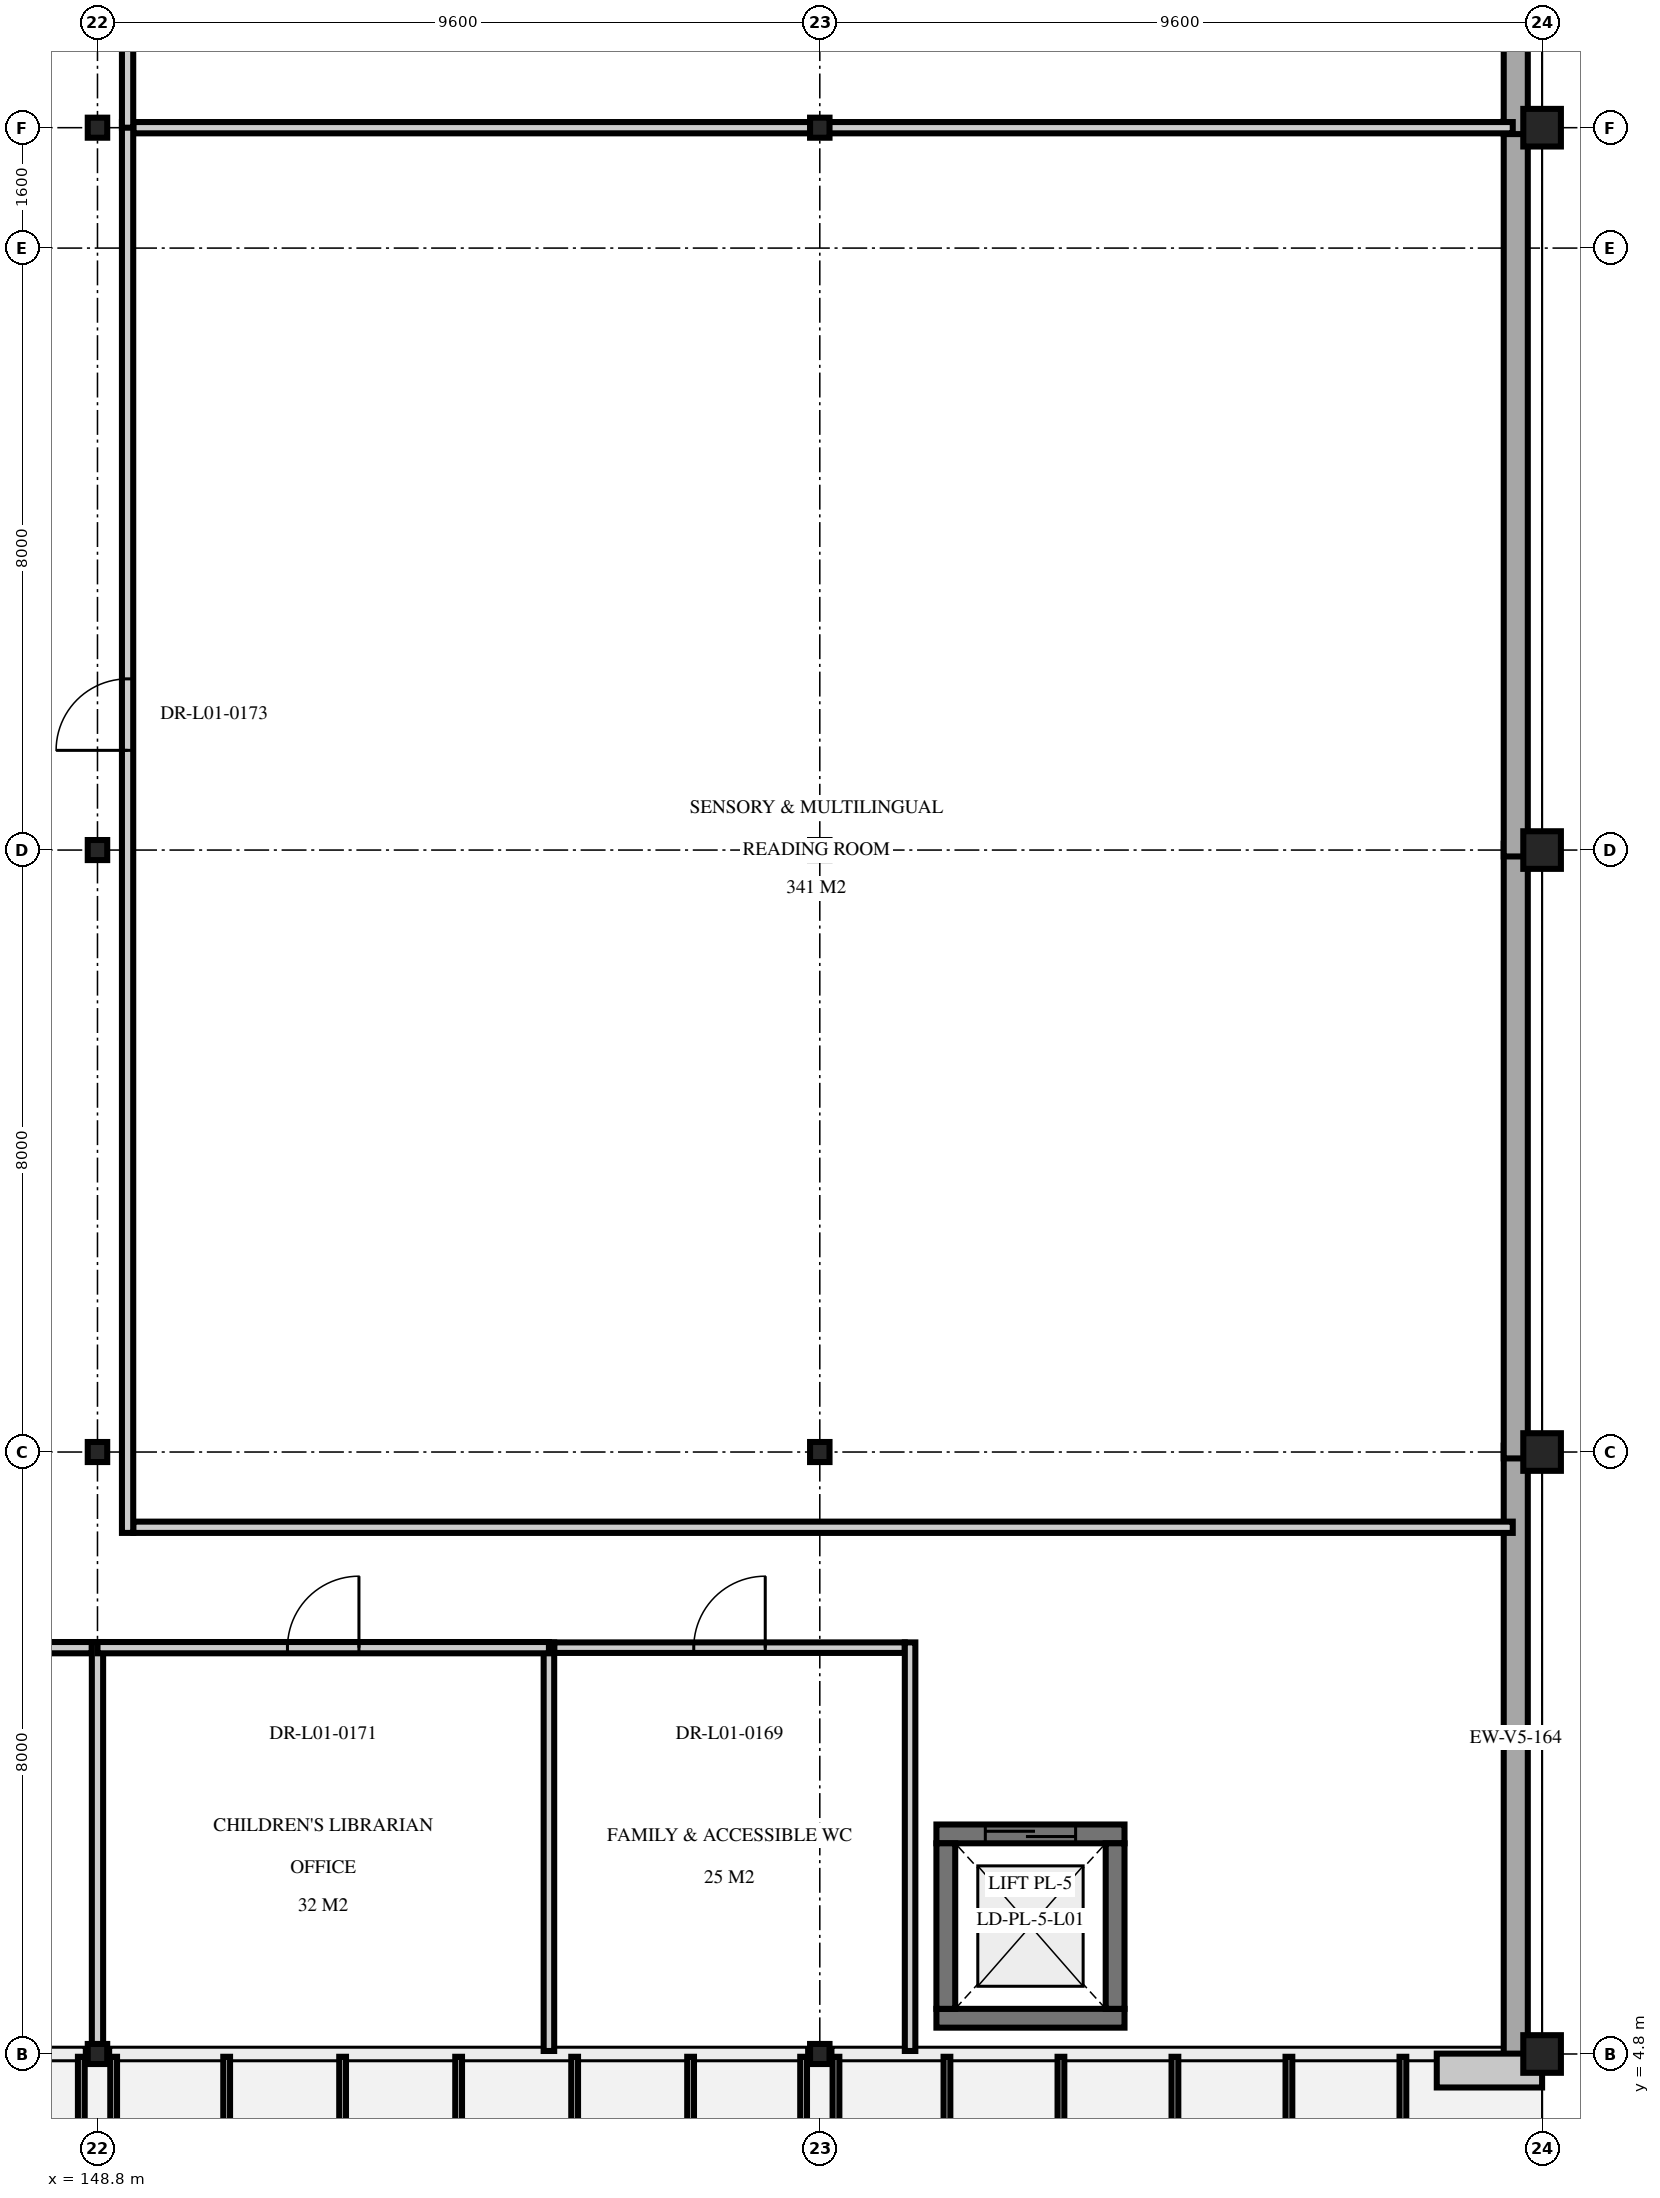
"""IFC4 building model, lengths in metres.
Left out: names, types, materials, properties, quantities, classifications, styles, units other than length and angle.
Written with IfcOpenShell. Run it as: python <this file> out.ifc"""

import sys

from ifc_helpers import new_model, si_unit, direction, frame, frame_2d, origin, origin_2d, place, context, subcontext, project, spatial, rectangle, i_section, extrude, element, fill, save


model = new_model("IFC4")
c1 = context("Model", 3, precision=1e-05, world=origin(), true_north=direction((0.0, 1.0)))
c2 = subcontext(c1, "Body", "Model", "MODEL_VIEW")
j1 = project(units=[si_unit("LENGTHUNIT", "METRE"), si_unit("PLANEANGLEUNIT", "RADIAN")], contexts=[c1])
p1 = place(None, origin())
s1 = spatial("IfcSite", under=j1, at=p1, CompositionType="ELEMENT")
p2 = place(p1, origin())
s2 = spatial("IfcBuilding", under=s1, at=p2, CompositionType="ELEMENT")
p3 = place(p2, frame((0.0, 0.0, 5.1)))
s3 = spatial("IfcBuildingStorey", under=s2, at=p3, CompositionType="ELEMENT", Elevation=5.1)
for number, where, z_axis, x_axis in (
    (1, (148.8, 4.8, 0.0), (0.0, 0.0, 1.0), (1.0, 0.0, 0.0)),
    (2, (148.8, 12.8, 0.0), (0.0, 0.0, 1.0), (1.0, 0.0, 0.0)),
    (3, (148.8, 20.8, 0.0), (0.0, 0.0, 1.0), (1.0, 0.0, 0.0)),
    (4, (148.8, 30.4, 0.0), (0.0, 0.0, 1.0), (1.0, 0.0, 0.0)),
    (5, (158.4, 4.8, 0.0), (0.0, 0.0, 1.0), (1.0, 0.0, 0.0)),
    (6, (158.4, 12.8, 0.0), (0.0, 0.0, 1.0), (1.0, 0.0, 0.0)),
    (7, (158.4, 20.8, 0.0), (0.0, 0.0, 1.0), (1.0, 0.0, 0.0)),
    (8, (158.4, 30.4, 0.0), (0.0, 0.0, 1.0), (1.0, 0.0, 0.0)),
):
    element("IfcColumn", number, at=place(p3, frame(where, z_axis=z_axis, x_axis=x_axis)), inside=s3, PredefinedType="COLUMN", context=c2, shape_type="SweptSolid", body=[
        extrude(i_section(OverallWidth=0.259, OverallDepth=0.267, WebThickness=0.013, FlangeThickness=0.021, at=origin_2d()), origin(), (0.0, 0.0, 1.0), 4.5),
    ])
for number, where, z_axis, x_axis in (
    (9, (168.0, 4.8, 0.0), (0.0, 0.0, 1.0), (1.0, 0.0, 0.0)),
    (10, (168.0, 12.8, 0.0), (0.0, 0.0, 1.0), (1.0, 0.0, 0.0)),
    (11, (168.0, 20.8, 0.0), (0.0, 0.0, 1.0), (1.0, 0.0, 0.0)),
    (12, (168.0, 30.4, 0.0), (0.0, 0.0, 1.0), (1.0, 0.0, 0.0)),
):
    element("IfcColumn", number, at=place(p3, frame(where, z_axis=z_axis, x_axis=x_axis)), inside=s3, PredefinedType="COLUMN", context=c2, shape_type="SweptSolid", body=[
        extrude(rectangle(XDim=0.5, YDim=0.5, at=origin_2d()), origin(), (0.0, 0.0, 1.0), 4.5),
    ])
p4 = place(p3, frame((162.45, 5.275, 0.0), z_axis=(0.0, 0.0, 1.0), x_axis=(-1.0, 0.0, 0.0)))
e13 = element("IfcWall", 13, at=p4, inside=s3, PredefinedType="SHEAR", context=c2, shape_type="SweptSolid", body=[
    extrude(rectangle(XDim=2.5, YDim=0.25, at=frame_2d((1.25, 0.0))), origin(), (0.0, 0.0, 1.0), 4.29),
])
p5 = place(p3, frame((159.95, 7.725, 0.0), z_axis=(0.0, 0.0, 1.0), x_axis=(1.0, 0.0, 0.0)))
e14 = element("IfcWall", 14, at=p5, inside=s3, PredefinedType="SHEAR", context=c2, shape_type="SweptSolid", body=[
    extrude(rectangle(XDim=2.5, YDim=0.25, at=frame_2d((1.25, 0.0))), origin(), (0.0, 0.0, 1.0), 4.29),
])
p6 = place(p5, frame((0.65, 0.0, 0.0)))
e15 = element("IfcOpeningElement", 15, at=p6, cuts=e14, PredefinedType="OPENING", context=c2, shape_type="SweptSolid", body=[
    extrude(rectangle(XDim=1.2, YDim=2.2, at=frame_2d((0.6, 1.1))), frame((0.0, 0.135, 0.0), z_axis=(0.0, -1.0, 0.0), x_axis=(1.0, 0.0, 0.0)), (0.0, 0.0, 1.0), 0.27),
])
for number, where, z_axis, x_axis in (
    (16, (160.075, 5.4, 0.0), (0.0, 0.0, 1.0), (0.0, 1.0, 0.0)),
    (17, (162.325, 7.6, 0.0), (0.0, 0.0, 1.0), (0.0, -1.0, 0.0)),
):
    element("IfcWall", number, at=place(p3, frame(where, z_axis=z_axis, x_axis=x_axis)), inside=s3, PredefinedType="SHEAR", context=c2, shape_type="SweptSolid", body=[
        extrude(rectangle(XDim=2.2, YDim=0.25, at=frame_2d((1.1, 0.0))), origin(), (0.0, 0.0, 1.0), 4.29),
    ])
for number, where, z_axis, x_axis in (
    (18, (167.65, 12.885, 0.0), (0.0, 0.0, 1.0), (0.0, -1.0, 0.0)),
    (19, (167.65, 20.885, 0.0), (0.0, 0.0, 1.0), (0.0, -1.0, 0.0)),
):
    element("IfcWall", number, at=place(p3, frame(where, z_axis=z_axis, x_axis=x_axis)), inside=s3, PredefinedType="SOLIDWALL", context=c2, shape_type="SweptSolid", body=[
        extrude(rectangle(XDim=8.17, YDim=0.32, at=frame_2d((4.085, 0.0))), origin(), (0.0, 0.0, 1.0), 3.91),
    ])
p7 = place(p3, frame((167.65, 30.485, 0.0), z_axis=(0.0, 0.0, 1.0), x_axis=(0.0, -1.0, 0.0)))
e20 = element("IfcWall", 20, at=p7, inside=s3, PredefinedType="SOLIDWALL", context=c2, shape_type="SweptSolid", body=[
    extrude(rectangle(XDim=9.77, YDim=0.32, at=frame_2d((4.885, 0.0))), origin(), (0.0, 0.0, 1.0), 3.91),
])
p8 = place(p3, frame((167.65, 44.885, 0.0), z_axis=(0.0, 0.0, 1.0), x_axis=(0.0, -1.0, 0.0)))
e21 = element("IfcWall", 21, at=p8, inside=s3, PredefinedType="SOLIDWALL", context=c2, shape_type="SweptSolid", body=[
    extrude(rectangle(XDim=14.57, YDim=0.32, at=frame_2d((7.285, 0.0))), origin(), (0.0, 0.0, 1.0), 3.91),
])
p9 = place(p3, frame((154.87, 10.2, 0.0), z_axis=(0.0, 0.0, 1.0), x_axis=(1.0, 0.0, 0.0)))
e22 = element("IfcWall", 22, at=p9, inside=s3, PredefinedType="PARTITIONING", context=c2, shape_type="SweptSolid", body=[
    extrude(rectangle(XDim=4.66, YDim=0.14, at=frame_2d((2.33, 0.0))), origin(), (0.0, 0.0, 1.0), 3.91),
])
p10 = place(p9, frame((1.855, 0.0, 0.0)))
e23 = element("IfcOpeningElement", 23, at=p10, cuts=e22, PredefinedType="OPENING", context=c2, shape_type="SweptSolid", body=[
    extrude(rectangle(XDim=0.95, YDim=2.1, at=frame_2d((0.475, 1.05))), frame((0.0, 0.08, 0.0), z_axis=(0.0, -1.0, 0.0), x_axis=(1.0, 0.0, 0.0)), (0.0, 0.0, 1.0), 0.16),
])
for number, where, z_axis, x_axis in (
    (24, (154.8, 4.84, 0.0), (0.0, 0.0, 1.0), (0.0, 1.0, 0.0)),
    (25, (159.6, 4.84, 0.0), (0.0, 0.0, 1.0), (0.0, 1.0, 0.0)),
):
    element("IfcWall", number, at=place(p3, frame(where, z_axis=z_axis, x_axis=x_axis)), inside=s3, PredefinedType="PARTITIONING", context=c2, shape_type="SweptSolid", body=[
        extrude(rectangle(XDim=5.43, YDim=0.14, at=frame_2d((2.715, 0.0))), origin(), (0.0, 0.0, 1.0), 3.945),
    ])
p11 = place(p3, frame((129.64, 10.2, 0.0), z_axis=(0.0, 0.0, 1.0), x_axis=(1.0, 0.0, 0.0)))
e26 = element("IfcWall", 26, at=p11, inside=s3, PredefinedType="PARTITIONING", context=c2, shape_type="SweptSolid", body=[
    extrude(rectangle(XDim=19.085, YDim=0.15, at=frame_2d((9.542, 0.0))), origin(), (0.0, 0.0, 1.0), 3.91),
])
p12 = place(p11, frame((9.068, 0.0, 0.0)))
e27 = element("IfcOpeningElement", 27, at=p12, cuts=e26, PredefinedType="OPENING", context=c2, shape_type="SweptSolid", body=[
    extrude(rectangle(XDim=0.95, YDim=2.15, at=frame_2d((0.475, 1.075))), frame((0.0, 0.085, 0.0), z_axis=(0.0, -1.0, 0.0), x_axis=(1.0, 0.0, 0.0)), (0.0, 0.0, 1.0), 0.17),
])
p13 = place(p3, frame((148.8, 4.84, 0.0), z_axis=(0.0, 0.0, 1.0), x_axis=(0.0, 1.0, 0.0)))
e28 = element("IfcWall", 28, at=p13, inside=s3, PredefinedType="PARTITIONING", context=c2, shape_type="SweptSolid", body=[
    extrude(rectangle(XDim=5.435, YDim=0.15, at=frame_2d((2.717, 0.0))), origin(), (0.0, 0.0, 1.0), 3.91),
])
p14 = place(p3, frame((148.8, 10.2, 0.0), z_axis=(0.0, 0.0, 1.0), x_axis=(1.0, 0.0, 0.0)))
e29 = element("IfcWall", 29, at=p14, inside=s3, PredefinedType="PARTITIONING", context=c2, shape_type="SweptSolid", body=[
    extrude(rectangle(XDim=6.0, YDim=0.15, at=frame_2d((3.0, 0.0))), origin(), (0.0, 0.0, 1.0), 3.91),
])
p15 = place(p14, frame((2.525, 0.0, 0.0)))
e30 = element("IfcOpeningElement", 30, at=p15, cuts=e29, PredefinedType="OPENING", context=c2, shape_type="SweptSolid", body=[
    extrude(rectangle(XDim=0.95, YDim=2.15, at=frame_2d((0.475, 1.075))), frame((0.0, 0.085, 0.0), z_axis=(0.0, -1.0, 0.0), x_axis=(1.0, 0.0, 0.0)), (0.0, 0.0, 1.0), 0.17),
])
for number, where, z_axis, x_axis in (
    (31, (149.275, 11.8, 0.0), (0.0, 0.0, 1.0), (1.0, 0.0, 0.0)),
    (32, (149.275, 30.4, 0.0), (0.0, 0.0, 1.0), (1.0, 0.0, 0.0)),
):
    element("IfcWall", number, at=place(p3, frame(where, z_axis=z_axis, x_axis=x_axis)), inside=s3, PredefinedType="PARTITIONING", context=c2, shape_type="SweptSolid", body=[
        extrude(rectangle(XDim=18.335, YDim=0.15, at=frame_2d((9.167, 0.0))), origin(), (0.0, 0.0, 1.0), 3.91),
    ])
p16 = place(p3, frame((149.2, 11.725, 0.0), z_axis=(0.0, 0.0, 1.0), x_axis=(0.0, 1.0, 0.0)))
e33 = element("IfcWall", 33, at=p16, inside=s3, PredefinedType="PARTITIONING", context=c2, shape_type="SweptSolid", body=[
    extrude(rectangle(XDim=18.75, YDim=0.15, at=frame_2d((9.375, 0.0))), origin(), (0.0, 0.0, 1.0), 3.945),
])
p17 = place(p16, frame((10.4, 0.0, 0.0)))
e34 = element("IfcOpeningElement", 34, at=p17, cuts=e33, PredefinedType="OPENING", context=c2, shape_type="SweptSolid", body=[
    extrude(rectangle(XDim=0.95, YDim=2.15, at=frame_2d((0.475, 1.075))), frame((0.0, 0.085, 0.0), z_axis=(0.0, -1.0, 0.0), x_axis=(1.0, 0.0, 0.0)), (0.0, 0.0, 1.0), 0.17),
])
p18 = place(p3, frame((149.2, 30.4, 0.0), z_axis=(0.0, 0.0, 1.0), x_axis=(0.0, 1.0, 0.0)))
e35 = element("IfcWall", 35, at=p18, inside=s3, PredefinedType="PARTITIONING", context=c2, shape_type="SweptSolid", body=[
    extrude(rectangle(XDim=14.36, YDim=0.15, at=frame_2d((7.18, 0.0))), origin(), (0.0, 0.0, 1.0), 3.945),
])
p19 = place(p18, frame((6.705, 0.0, 0.0)))
e36 = element("IfcOpeningElement", 36, at=p19, cuts=e35, PredefinedType="OPENING", context=c2, shape_type="SweptSolid", body=[
    extrude(rectangle(XDim=0.95, YDim=2.15, at=frame_2d((0.475, 1.075))), frame((0.0, 0.085, 0.0), z_axis=(0.0, -1.0, 0.0), x_axis=(1.0, 0.0, 0.0)), (0.0, 0.0, 1.0), 0.17),
])
p20 = place(p6, origin())
e37 = element("IfcDoor", 37, at=p20, inside=s3, OperationType="DOUBLE_DOOR_SLIDING", PredefinedType="DOOR", context=c2, shape_type="SweptSolid", body=[
    extrude(rectangle(XDim=1.2, YDim=2.2, at=frame_2d((0.6, 1.1))), frame((0.0, 0.025, 0.0), z_axis=(0.0, -1.0, 0.0), x_axis=(1.0, 0.0, 0.0)), (0.0, 0.0, 1.0), 0.05),
])
fill(e15, e37)
p21 = place(p10, origin())
e38 = element("IfcDoor", 38, at=p21, inside=s3, OperationType="SINGLE_SWING_RIGHT", PredefinedType="DOOR", context=c2, shape_type="SweptSolid", body=[
    extrude(rectangle(XDim=0.95, YDim=2.1, at=frame_2d((0.475, 1.05))), frame((0.0, 0.025, 0.0), z_axis=(0.0, -1.0, 0.0), x_axis=(1.0, 0.0, 0.0)), (0.0, 0.0, 1.0), 0.05),
])
fill(e23, e38)
p22 = place(p15, origin())
e39 = element("IfcDoor", 39, at=p22, inside=s3, OperationType="SINGLE_SWING_RIGHT", PredefinedType="DOOR", context=c2, shape_type="SweptSolid", body=[
    extrude(rectangle(XDim=0.95, YDim=2.15, at=frame_2d((0.475, 1.075))), frame((0.0, 0.025, 0.0), z_axis=(0.0, -1.0, 0.0), x_axis=(1.0, 0.0, 0.0)), (0.0, 0.0, 1.0), 0.05),
])
fill(e30, e39)
p23 = place(p17, origin())
e40 = element("IfcDoor", 40, at=p23, inside=s3, OperationType="SINGLE_SWING_LEFT", PredefinedType="DOOR", context=c2, shape_type="SweptSolid", body=[
    extrude(rectangle(XDim=0.95, YDim=2.15, at=frame_2d((0.475, 1.075))), frame((0.0, 0.025, 0.0), z_axis=(0.0, -1.0, 0.0), x_axis=(1.0, 0.0, 0.0)), (0.0, 0.0, 1.0), 0.05),
])
fill(e34, e40)
save(model, sys.argv[1])
